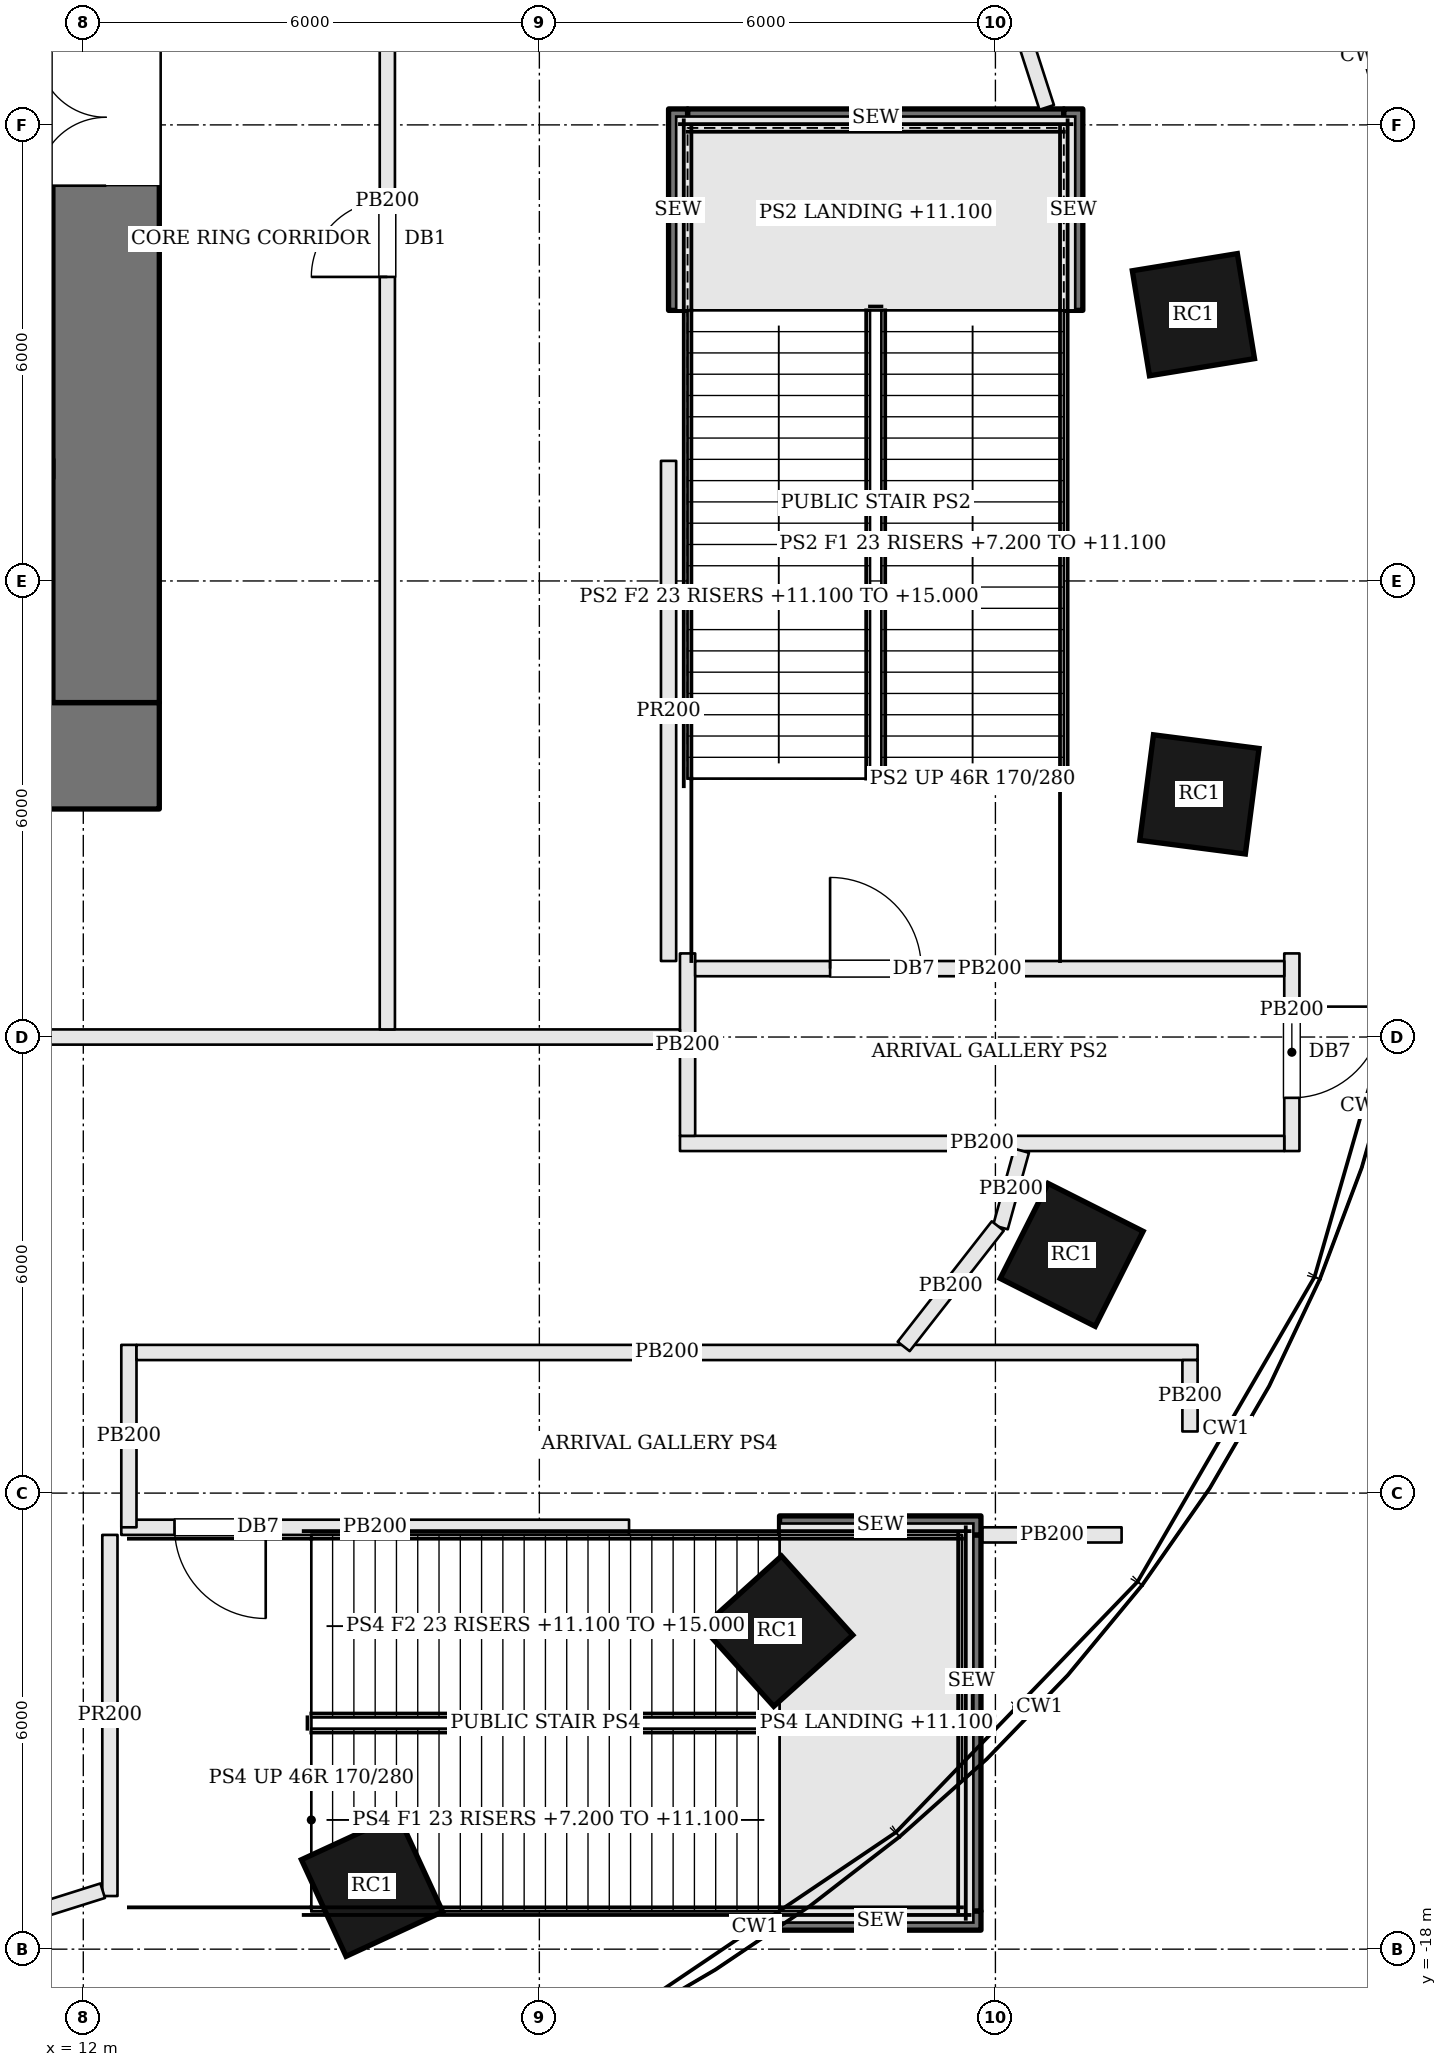
"""IFC4 building model, lengths in metres.
Left out: names, types, materials, properties, quantities, classifications, styles, units other than length and angle.
Written with IfcOpenShell. Run it as: python <this file> out.ifc"""

import sys

from ifc_helpers import new_model, si_unit, direction, frame, frame_2d, origin, origin_2d, place, context, subcontext, project, spatial, rectangle, extrude, element, fill, save


model = new_model("IFC4")
c1 = context("Model", 3, precision=1e-05, world=origin(), true_north=direction((0.0, 1.0)))
c2 = subcontext(c1, "Body", "Model", "MODEL_VIEW")
j1 = project(units=[si_unit("LENGTHUNIT", "METRE"), si_unit("PLANEANGLEUNIT", "RADIAN")], contexts=[c1])
p1 = place(None, origin())
s1 = spatial("IfcSite", under=j1, at=p1, CompositionType="ELEMENT")
p2 = place(p1, origin())
s2 = spatial("IfcBuilding", under=s1, at=p2, CompositionType="ELEMENT")
p3 = place(p2, frame((0.0, 0.0, 7.2)))
s3 = spatial("IfcBuildingStorey", under=s2, at=p3, CompositionType="ELEMENT", Elevation=7.2)
p4 = place(p3, frame((-13.0, -2.3, 0.0), z_axis=(0.0, 0.0, 1.0), x_axis=(1.0, 0.0, 0.0)))
e1 = element("IfcWall", 1, at=p4, inside=s3, PredefinedType="SHEAR", context=c2, shape_type="SweptSolid", body=[
    extrude(rectangle(XDim=26.0, YDim=1.4, at=frame_2d((13.0, 0.0))), origin(), (0.0, 0.0, 1.0), 7.8),
])
p5 = place(p4, frame((9.55, 0.0, 0.0)))
e2 = element("IfcOpeningElement", 2, at=p5, cuts=e1, PredefinedType="OPENING", context=c2, shape_type="SweptSolid", body=[
    extrude(rectangle(XDim=0.9, YDim=2.1, at=frame_2d((0.45, 1.05))), frame((0.0, 0.71, 0.0), z_axis=(0.0, -1.0, 0.0), x_axis=(1.0, 0.0, 0.0)), (0.0, 0.0, 1.0), 1.42),
])
p6 = place(p4, frame((12.8, 0.0, 0.0)))
e3 = element("IfcOpeningElement", 3, at=p6, cuts=e1, PredefinedType="OPENING", context=c2, shape_type="SweptSolid", body=[
    extrude(rectangle(XDim=0.9, YDim=2.1, at=frame_2d((0.45, 1.05))), frame((0.0, 0.71, 0.0), z_axis=(0.0, -1.0, 0.0), x_axis=(1.0, 0.0, 0.0)), (0.0, 0.0, 1.0), 1.42),
])
p7 = place(p4, frame((15.0, 0.0, 0.0)))
e4 = element("IfcOpeningElement", 4, at=p7, cuts=e1, PredefinedType="OPENING", context=c2, shape_type="SweptSolid", body=[
    extrude(rectangle(XDim=1.0, YDim=2.1, at=frame_2d((0.5, 1.05))), frame((0.0, 0.71, 0.0), z_axis=(0.0, -1.0, 0.0), x_axis=(1.0, 0.0, 0.0)), (0.0, 0.0, 1.0), 1.42),
])
p8 = place(p4, frame((16.7, 0.0, 0.0)))
e5 = element("IfcOpeningElement", 5, at=p8, cuts=e1, PredefinedType="OPENING", context=c2, shape_type="SweptSolid", body=[
    extrude(rectangle(XDim=0.9, YDim=2.1, at=frame_2d((0.45, 1.05))), frame((0.0, 0.71, 0.0), z_axis=(0.0, -1.0, 0.0), x_axis=(1.0, 0.0, 0.0)), (0.0, 0.0, 1.0), 1.42),
])
p9 = place(p3, frame((12.3, -1.6, 0.0), z_axis=(0.0, 0.0, 1.0), x_axis=(0.0, 1.0, 0.0)))
e6 = element("IfcWall", 6, at=p9, inside=s3, PredefinedType="SHEAR", context=c2, shape_type="SweptSolid", body=[
    extrude(rectangle(XDim=12.2, YDim=1.4, at=frame_2d((6.1, 0.0))), origin(), (0.0, 0.0, 1.0), 7.8),
])
p10 = place(p9, frame((6.8, 0.0, 0.0)))
e7 = element("IfcOpeningElement", 7, at=p10, cuts=e6, PredefinedType="OPENING", context=c2, shape_type="SweptSolid", body=[
    extrude(rectangle(XDim=1.8, YDim=2.1, at=frame_2d((0.9, 1.05))), frame((0.0, 0.71, 0.0), z_axis=(0.0, -1.0, 0.0), x_axis=(1.0, 0.0, 0.0)), (0.0, 0.0, 1.0), 1.42),
])
for number, where, z_axis, x_axis in (
    (8, (26.605, 3.503, 0.0), (0.0, 0.0, 1.0), (-0.161, 0.987, 0.0)),
    (9, (15.799, -17.165, 0.0), (0.0, 0.0, 1.0), (0.908, 0.419, 0.0)),
    (10, (21.135, -13.817, 0.0), (0.0, 0.0, 1.0), (0.743, 0.67, 0.0)),
    (11, (25.003, -8.866, 0.0), (0.0, 0.0, 1.0), (0.45, 0.893, 0.0)),
    (12, (26.684, -2.808, 0.0), (0.0, 0.0, 1.0), (0.128, 0.992, 0.0)),
):
    element("IfcColumn", number, at=place(p3, frame(where, z_axis=z_axis, x_axis=x_axis)), inside=s3, PredefinedType="COLUMN", context=c2, shape_type="SweptSolid", body=[
        extrude(rectangle(XDim=1.4, YDim=1.4, at=origin_2d()), origin(), (0.0, 0.0, 1.0), 7.8),
    ])
p11 = place(p3, frame((27.9, -4.9, 0.0), z_axis=(0.0, 0.0, 1.0), x_axis=(0.0, -1.0, 0.0)))
e13 = element("IfcWall", 13, at=p11, inside=s3, PredefinedType="PARTITIONING", context=c2, shape_type="SweptSolid", body=[
    extrude(rectangle(XDim=2.6, YDim=0.2, at=frame_2d((1.3, 0.0))), origin(), (0.0, 0.0, 1.0), 6.83),
])
p12 = place(p11, frame((0.7, 0.0, 0.0)))
e14 = element("IfcOpeningElement", 14, at=p12, cuts=e13, PredefinedType="OPENING", context=c2, shape_type="SweptSolid", body=[
    extrude(rectangle(XDim=1.2, YDim=2.1, at=frame_2d((0.6, 1.05))), frame((0.0, 0.11, 0.0), z_axis=(0.0, -1.0, 0.0), x_axis=(1.0, 0.0, 0.0)), (0.0, 0.0, 1.0), 0.22),
])
p13 = place(p3, frame((27.8, -7.4, 0.0), z_axis=(0.0, 0.0, 1.0), x_axis=(-1.0, 0.0, 0.0)))
e15 = element("IfcWall", 15, at=p13, inside=s3, PredefinedType="PARTITIONING", context=c2, shape_type="SweptSolid", body=[
    extrude(rectangle(XDim=7.95, YDim=0.2, at=frame_2d((3.975, 0.0))), origin(), (0.0, 0.0, 1.0), 6.83),
])
p14 = place(p3, frame((19.95, -7.3, 0.0), z_axis=(0.0, 0.0, 1.0), x_axis=(0.0, 1.0, 0.0)))
e16 = element("IfcWall", 16, at=p14, inside=s3, PredefinedType="PARTITIONING", context=c2, shape_type="SweptSolid", body=[
    extrude(rectangle(XDim=2.4, YDim=0.2, at=frame_2d((1.2, 0.0))), origin(), (0.0, 0.0, 1.0), 6.83),
])
p15 = place(p3, frame((20.05, -5.1, 0.0), z_axis=(0.0, 0.0, 1.0), x_axis=(1.0, 0.0, 0.0)))
e17 = element("IfcWall", 17, at=p15, inside=s3, PredefinedType="PARTITIONING", context=c2, shape_type="SweptSolid", body=[
    extrude(rectangle(XDim=7.75, YDim=0.2, at=frame_2d((3.875, 0.0))), origin(), (0.0, 0.0, 1.0), 6.83),
])
p16 = place(p15, frame((1.775, 0.0, 0.0)))
e18 = element("IfcOpeningElement", 18, at=p16, cuts=e17, PredefinedType="OPENING", context=c2, shape_type="SweptSolid", body=[
    extrude(rectangle(XDim=1.2, YDim=2.1, at=frame_2d((0.6, 1.05))), frame((0.0, 0.11, 0.0), z_axis=(0.0, -1.0, 0.0), x_axis=(1.0, 0.0, 0.0)), (0.0, 0.0, 1.0), 0.22),
])
p17 = place(p3, frame((25.66, -12.55, 0.0), z_axis=(0.0, 0.0, 1.0), x_axis=(-1.0, 0.0, 0.0)))
e19 = element("IfcWall", 19, at=p17, inside=s3, PredefinedType="PARTITIONING", context=c2, shape_type="SweptSolid", body=[
    extrude(rectangle(XDim=1.83, YDim=0.2, at=frame_2d((0.915, 0.0))), origin(), (0.0, 0.0, 1.0), 6.83),
])
p18 = place(p3, frame((19.18, -12.45, 0.0), z_axis=(0.0, 0.0, 1.0), x_axis=(-1.0, 0.0, 0.0)))
e20 = element("IfcWall", 20, at=p18, inside=s3, PredefinedType="PARTITIONING", context=c2, shape_type="SweptSolid", body=[
    extrude(rectangle(XDim=6.68, YDim=0.2, at=frame_2d((3.34, 0.0))), origin(), (0.0, 0.0, 1.0), 6.83),
])
p19 = place(p18, frame((4.78, 0.0, 0.0)))
e21 = element("IfcOpeningElement", 21, at=p19, cuts=e20, PredefinedType="OPENING", context=c2, shape_type="SweptSolid", body=[
    extrude(rectangle(XDim=1.2, YDim=2.1, at=frame_2d((0.6, 1.05))), frame((0.0, 0.11, 0.0), z_axis=(0.0, -1.0, 0.0), x_axis=(1.0, 0.0, 0.0)), (0.0, 0.0, 1.0), 0.22),
])
p20 = place(p3, frame((12.6, -12.45, 0.0), z_axis=(0.0, 0.0, 1.0), x_axis=(0.0, 1.0, 0.0)))
e22 = element("IfcWall", 22, at=p20, inside=s3, PredefinedType="PARTITIONING", context=c2, shape_type="SweptSolid", body=[
    extrude(rectangle(XDim=2.4, YDim=0.2, at=frame_2d((1.2, 0.0))), origin(), (0.0, 0.0, 1.0), 6.83),
])
p21 = place(p3, frame((12.7, -10.15, 0.0), z_axis=(0.0, 0.0, 1.0), x_axis=(1.0, 0.0, 0.0)))
e23 = element("IfcWall", 23, at=p21, inside=s3, PredefinedType="PARTITIONING", context=c2, shape_type="SweptSolid", body=[
    extrude(rectangle(XDim=13.96, YDim=0.2, at=frame_2d((6.98, 0.0))), origin(), (0.0, 0.0, 1.0), 6.83),
])
p22 = place(p3, frame((26.56, -10.25, 0.0), z_axis=(0.0, 0.0, 1.0), x_axis=(0.0, -1.0, 0.0)))
e24 = element("IfcWall", 24, at=p22, inside=s3, PredefinedType="PARTITIONING", context=c2, shape_type="SweptSolid", body=[
    extrude(rectangle(XDim=0.939, YDim=0.2, at=frame_2d((0.469, 0.0))), origin(), (0.0, 0.0, 1.0), 6.83),
])
p23 = place(p3, frame((-19.85, -6.0, 0.0), z_axis=(0.0, 0.0, 1.0), x_axis=(1.0, 0.0, 0.0)))
e25 = element("IfcWall", 25, at=p23, inside=s3, PredefinedType="PARTITIONING", context=c2, shape_type="SweptSolid", body=[
    extrude(rectangle(XDim=39.7, YDim=0.2, at=frame_2d((19.85, 0.0))), origin(), (0.0, 0.0, 1.0), 6.83),
])
p24 = place(p23, frame((13.172, 0.0, 0.0)))
e26 = element("IfcOpeningElement", 26, at=p24, cuts=e25, PredefinedType="OPENING", context=c2, shape_type="SweptSolid", body=[
    extrude(rectangle(XDim=1.2, YDim=2.1, at=frame_2d((0.6, 1.05))), frame((0.0, 0.11, 0.0), z_axis=(0.0, -1.0, 0.0), x_axis=(1.0, 0.0, 0.0)), (0.0, 0.0, 1.0), 0.22),
])
p25 = place(p23, frame((24.211, 0.0, 0.0)))
e27 = element("IfcOpeningElement", 27, at=p25, cuts=e25, PredefinedType="OPENING", context=c2, shape_type="SweptSolid", body=[
    extrude(rectangle(XDim=2.4, YDim=2.4, at=frame_2d((1.2, 1.2))), frame((0.0, 0.11, 0.0), z_axis=(0.0, -1.0, 0.0), x_axis=(1.0, 0.0, 0.0)), (0.0, 0.0, 1.0), 0.22),
])
p26 = place(p23, frame((7.011, 0.0, 0.0)))
e28 = element("IfcOpeningElement", 28, at=p26, cuts=e25, PredefinedType="OPENING", context=c2, shape_type="SweptSolid", body=[
    extrude(rectangle(XDim=2.4, YDim=2.4, at=frame_2d((1.2, 1.2))), frame((0.0, 0.11, 0.0), z_axis=(0.0, -1.0, 0.0), x_axis=(1.0, 0.0, 0.0)), (0.0, 0.0, 1.0), 0.22),
])
p27 = place(p3, frame((23.817, 8.891, 0.0), z_axis=(0.0, 0.0, 1.0), x_axis=(0.306913488124, -0.951737416942, 0.0)))
e29 = element("IfcWall", 29, at=p27, inside=s3, PredefinedType="PARTITIONING", context=c2, shape_type="SweptSolid", body=[
    extrude(rectangle(XDim=2.796, YDim=0.2, at=frame_2d((1.398, 0.0))), origin(), (0.0, 0.0, 1.0), 6.83),
])
p28 = place(p3, frame((19.7, 1.58, 0.0), z_axis=(0.0, 0.0, 1.0), x_axis=(0.0, -1.0, 0.0)))
e30 = element("IfcWall", 30, at=p28, inside=s3, PredefinedType="PARTITIONING", context=c2, shape_type="SweptSolid", body=[
    extrude(rectangle(XDim=6.58, YDim=0.2, at=frame_2d((3.29, 0.0))), origin(), (0.0, 0.0, 1.0), 6.934),
])
p29 = place(p3, frame((16.0, -5.9, 0.0), z_axis=(0.0, 0.0, 1.0), x_axis=(0.0, 1.0, 0.0)))
e31 = element("IfcWall", 31, at=p29, inside=s3, PredefinedType="PARTITIONING", context=c2, shape_type="SweptSolid", body=[
    extrude(rectangle(XDim=21.792, YDim=0.2, at=frame_2d((10.896, 0.0))), origin(), (0.0, 0.0, 1.0), 6.83),
])
p30 = place(p29, frame((9.9, 0.0, 0.0)))
e32 = element("IfcOpeningElement", 32, at=p30, cuts=e31, PredefinedType="OPENING", context=c2, shape_type="SweptSolid", body=[
    extrude(rectangle(XDim=1.0, YDim=2.1, at=frame_2d((0.5, 1.05))), frame((0.0, 0.11, 0.0), z_axis=(0.0, -1.0, 0.0), x_axis=(1.0, 0.0, 0.0)), (0.0, 0.0, 1.0), 0.22),
])
p31 = place(p3, frame((24.345, -7.496, 0.0), z_axis=(0.0, 0.0, 1.0), x_axis=(-0.267089429493, -0.963671747357, 0.0)))
e33 = element("IfcWall", 33, at=p31, inside=s3, PredefinedType="PARTITIONING", context=c2, shape_type="SweptSolid", body=[
    extrude(rectangle(XDim=1.045, YDim=0.2, at=frame_2d((0.522, 0.0))), origin(), (0.0, 0.0, 1.0), 6.83),
])
p32 = place(p3, frame((24.031, -8.486, 0.0), z_axis=(0.0, 0.0, 1.0), x_axis=(-0.615578080386, -0.788075901768, 0.0)))
e34 = element("IfcWall", 34, at=p32, inside=s3, PredefinedType="PARTITIONING", context=c2, shape_type="SweptSolid", body=[
    extrude(rectangle(XDim=2.011, YDim=0.2, at=frame_2d((1.006, 0.0))), origin(), (0.0, 0.0, 1.0), 6.83),
])
p33 = place(p3, frame((12.35, -12.55, 0.0), z_axis=(0.0, 0.0, 1.0), x_axis=(0.0, -1.0, 0.0)))
e35 = element("IfcWall", 35, at=p33, inside=s3, PredefinedType="PARTITIONING", context=c2, shape_type="SweptSolid", body=[
    extrude(rectangle(XDim=4.751, YDim=0.2, at=frame_2d((2.375, 0.0))), origin(), (0.0, 0.0, 1.0), 6.934),
])
p34 = place(p3, frame((12.255, -17.231, 0.0), z_axis=(0.0, 0.0, 1.0), x_axis=(-0.953832821469, -0.300338057344, 0.0)))
e36 = element("IfcWall", 36, at=p34, inside=s3, PredefinedType="PARTITIONING", context=c2, shape_type="SweptSolid", body=[
    extrude(rectangle(XDim=2.917, YDim=0.2, at=frame_2d((1.458, 0.0))), origin(), (0.0, 0.0, 1.0), 6.83),
])
p35 = place(p3, frame((24.9, 6.085, 0.0), z_axis=(0.0, 0.0, 1.0), x_axis=(-1.0, 0.0, 0.0)))
e37 = element("IfcWall", 37, at=p35, inside=s3, PredefinedType="SOLIDWALL", context=c2, shape_type="SweptSolid", body=[
    extrude(rectangle(XDim=4.95, YDim=0.25, at=frame_2d((2.475, 0.0))), origin(), (0.0, 0.0, 1.0), 7.55),
])
for number, where, z_axis, x_axis in (
    (38, (19.825, 3.56, 0.0), (0.0, 0.0, 1.0), (0.0, 1.0, 0.0)),
    (39, (25.025, 3.56, 0.0), (0.0, 0.0, 1.0), (0.0, 1.0, 0.0)),
):
    element("IfcWall", number, at=place(p3, frame(where, z_axis=z_axis, x_axis=x_axis)), inside=s3, PredefinedType="SOLIDWALL", context=c2, shape_type="SweptSolid", body=[
        extrude(rectangle(XDim=2.65, YDim=0.25, at=frame_2d((1.325, 0.0))), origin(), (0.0, 0.0, 1.0), 7.55),
    ])
p36 = place(p3, frame((23.685, -17.5, 0.0), z_axis=(0.0, 0.0, 1.0), x_axis=(0.0, 1.0, 0.0)))
e40 = element("IfcWall", 40, at=p36, inside=s3, PredefinedType="SOLIDWALL", context=c2, shape_type="SweptSolid", body=[
    extrude(rectangle(XDim=4.95, YDim=0.25, at=frame_2d((2.475, 0.0))), origin(), (0.0, 0.0, 1.0), 7.55),
])
for number, where, z_axis, x_axis in (
    (41, (21.16, -17.625, 0.0), (0.0, 0.0, 1.0), (1.0, 0.0, 0.0)),
    (42, (21.16, -12.425, 0.0), (0.0, 0.0, 1.0), (1.0, 0.0, 0.0)),
):
    element("IfcWall", number, at=place(p3, frame(where, z_axis=z_axis, x_axis=x_axis)), inside=s3, PredefinedType="SOLIDWALL", context=c2, shape_type="SweptSolid", body=[
        extrude(rectangle(XDim=2.65, YDim=0.25, at=frame_2d((1.325, 0.0))), origin(), (0.0, 0.0, 1.0), 7.55),
    ])
p37 = place(p10, origin())
e43 = element("IfcDoor", 43, at=p37, inside=s3, OperationType="DOUBLE_DOOR_SINGLE_SWING", PredefinedType="DOOR", context=c2, shape_type="SweptSolid", body=[
    extrude(rectangle(XDim=1.8, YDim=2.1, at=frame_2d((0.9, 1.05))), frame((0.0, 0.025, 0.0), z_axis=(0.0, -1.0, 0.0), x_axis=(1.0, 0.0, 0.0)), (0.0, 0.0, 1.0), 0.05),
])
fill(e7, e43)
p38 = place(p16, origin())
e44 = element("IfcDoor", 44, at=p38, inside=s3, OperationType="SINGLE_SWING_LEFT", PredefinedType="DOOR", context=c2, shape_type="SweptSolid", body=[
    extrude(rectangle(XDim=1.2, YDim=2.1, at=frame_2d((0.6, 1.05))), frame((0.0, 0.025, 0.0), z_axis=(0.0, -1.0, 0.0), x_axis=(1.0, 0.0, 0.0)), (0.0, 0.0, 1.0), 0.05),
])
fill(e18, e44)
p39 = place(p12, origin())
e45 = element("IfcDoor", 45, at=p39, inside=s3, OperationType="SINGLE_SWING_LEFT", PredefinedType="DOOR", context=c2, shape_type="SweptSolid", body=[
    extrude(rectangle(XDim=1.2, YDim=2.1, at=frame_2d((0.6, 1.05))), frame((0.0, 0.025, 0.0), z_axis=(0.0, -1.0, 0.0), x_axis=(1.0, 0.0, 0.0)), (0.0, 0.0, 1.0), 0.05),
])
fill(e14, e45)
p40 = place(p19, origin())
e46 = element("IfcDoor", 46, at=p40, inside=s3, OperationType="SINGLE_SWING_LEFT", PredefinedType="DOOR", context=c2, shape_type="SweptSolid", body=[
    extrude(rectangle(XDim=1.2, YDim=2.1, at=frame_2d((0.6, 1.05))), frame((0.0, 0.025, 0.0), z_axis=(0.0, -1.0, 0.0), x_axis=(1.0, 0.0, 0.0)), (0.0, 0.0, 1.0), 0.05),
])
fill(e21, e46)
p41 = place(p30, origin())
e47 = element("IfcDoor", 47, at=p41, inside=s3, OperationType="SINGLE_SWING_LEFT", PredefinedType="DOOR", context=c2, shape_type="SweptSolid", body=[
    extrude(rectangle(XDim=1.0, YDim=2.1, at=frame_2d((0.5, 1.05))), frame((0.0, 0.025, 0.0), z_axis=(0.0, -1.0, 0.0), x_axis=(1.0, 0.0, 0.0)), (0.0, 0.0, 1.0), 0.05),
])
fill(e32, e47)
save(model, sys.argv[1])
